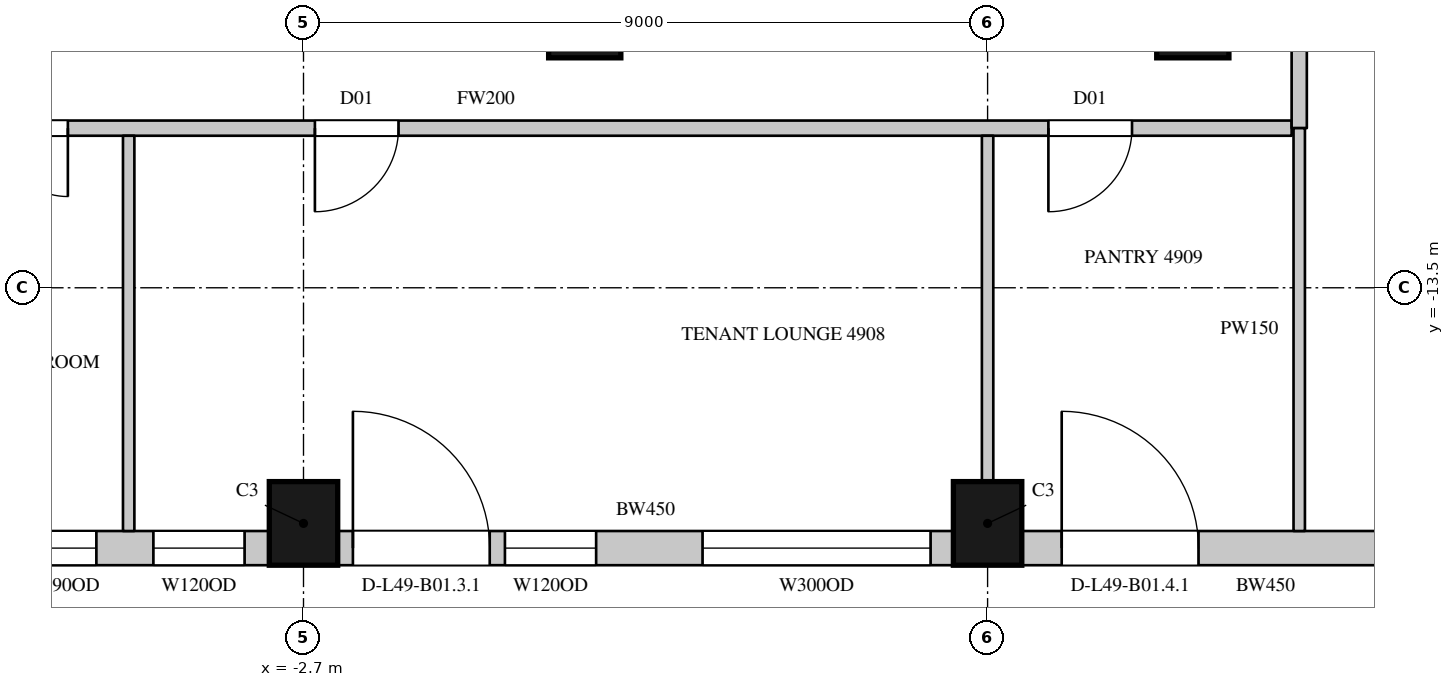
"""IFC4 building model, lengths in metres.
Left out: names, types, materials, properties, quantities, classifications, styles, units other than length and angle.
Written with IfcOpenShell. Run it as: python <this file> out.ifc"""

import sys

from ifc_helpers import new_model, si_unit, direction, frame, frame_2d, origin, origin_2d, place, context, subcontext, project, spatial, rectangle, circle, extrude, element, fill, save


model = new_model("IFC4")
c1 = context("Model", 3, precision=1e-05, world=origin(), true_north=direction((0.0, 1.0)))
c2 = subcontext(c1, "Body", "Model", "MODEL_VIEW")
j1 = project(units=[si_unit("LENGTHUNIT", "METRE"), si_unit("PLANEANGLEUNIT", "RADIAN")], contexts=[c1])
p1 = place(None, origin())
s1 = spatial("IfcSite", under=j1, at=p1, CompositionType="ELEMENT")
p2 = place(p1, origin())
s2 = spatial("IfcBuilding", under=s1, at=p2, CompositionType="ELEMENT")
p3 = place(p2, frame((0.0, 0.0, 222.0)))
s3 = spatial("IfcBuildingStorey", under=s2, at=p3, CompositionType="ELEMENT", Elevation=222.0)
for number, where, z_axis, x_axis in (
    (1, (-2.7, -16.6, 0.0), (0.0, 0.0, 1.0), (1.0, 0.0, 0.0)),
    (2, (6.3, -16.6, 0.0), (0.0, 0.0, 1.0), (1.0, 0.0, 0.0)),
):
    element("IfcColumn", number, at=place(p3, frame(where, z_axis=z_axis, x_axis=x_axis)), inside=s3, PredefinedType="COLUMN", context=c2, shape_type="SweptSolid", body=[
        extrude(rectangle(XDim=0.9, YDim=1.1, at=origin_2d()), origin(), (0.0, 0.0, 1.0), 4.1),
    ])
for number, where, z_axis, x_axis in (
    (3, (1.0, -10.0, 0.0), (0.0, 0.0, 1.0), (1.0, 0.0, 0.0)),
    (4, (9.0, -10.0, 0.0), (0.0, 0.0, 1.0), (1.0, 0.0, 0.0)),
):
    element("IfcColumn", number, at=place(p3, frame(where, z_axis=z_axis, x_axis=x_axis)), inside=s3, PredefinedType="COLUMN", context=c2, shape_type="SweptSolid", body=[
        extrude(circle(Radius=0.475, at=origin_2d()), origin(), (0.0, 0.0, 1.0), 4.1),
    ])
p4 = place(p3, frame((-11.25, -16.925, 0.0), z_axis=(0.0, 0.0, 1.0), x_axis=(1.0, 0.0, 0.0)))
e5 = element("IfcWall", 5, at=p4, inside=s3, PredefinedType="SOLIDWALL", context=c2, shape_type="SweptSolid", body=[
    extrude(rectangle(XDim=8.1, YDim=0.45, at=frame_2d((4.05, 0.0))), origin(), (0.0, 0.0, 1.0), 3.8),
])
p5 = place(p4, frame((0.3, 0.0, 1.05)))
e6 = element("IfcOpeningElement", 6, at=p5, cuts=e5, PredefinedType="OPENING", context=c2, shape_type="SweptSolid", body=[
    extrude(rectangle(XDim=3.0, YDim=2.4, at=frame_2d((1.5, 1.2))), frame((0.0, 0.235, 0.0), z_axis=(0.0, -1.0, 0.0), x_axis=(1.0, 0.0, 0.0)), (0.0, 0.0, 1.0), 0.47),
])
p6 = place(p4, frame((4.925, 0.0, 1.05)))
e7 = element("IfcOpeningElement", 7, at=p6, cuts=e5, PredefinedType="OPENING", context=c2, shape_type="SweptSolid", body=[
    extrude(rectangle(XDim=0.9, YDim=2.4, at=frame_2d((0.45, 1.2))), frame((0.0, 0.235, 0.0), z_axis=(0.0, -1.0, 0.0), x_axis=(1.0, 0.0, 0.0)), (0.0, 0.0, 1.0), 0.47),
])
p7 = place(p4, frame((6.575, 0.0, 1.05)))
e8 = element("IfcOpeningElement", 8, at=p7, cuts=e5, PredefinedType="OPENING", context=c2, shape_type="SweptSolid", body=[
    extrude(rectangle(XDim=1.2, YDim=2.4, at=frame_2d((0.6, 1.2))), frame((0.0, 0.235, 0.0), z_axis=(0.0, -1.0, 0.0), x_axis=(1.0, 0.0, 0.0)), (0.0, 0.0, 1.0), 0.47),
])
p8 = place(p3, frame((-2.25, -16.925, 0.0), z_axis=(0.0, 0.0, 1.0), x_axis=(1.0, 0.0, 0.0)))
e9 = element("IfcWall", 9, at=p8, inside=s3, PredefinedType="SOLIDWALL", context=c2, shape_type="SweptSolid", body=[
    extrude(rectangle(XDim=8.1, YDim=0.45, at=frame_2d((4.05, 0.0))), origin(), (0.0, 0.0, 1.0), 3.8),
])
p9 = place(p8, frame((0.2, 0.0, 0.0)))
e10 = element("IfcOpeningElement", 10, at=p9, cuts=e9, PredefinedType="OPENING", context=c2, shape_type="SweptSolid", body=[
    extrude(rectangle(XDim=1.8, YDim=2.4, at=frame_2d((0.9, 1.2))), frame((0.0, 0.235, 0.0), z_axis=(0.0, -1.0, 0.0), x_axis=(1.0, 0.0, 0.0)), (0.0, 0.0, 1.0), 0.47),
])
p10 = place(p8, frame((2.2, 0.0, 1.05)))
e11 = element("IfcOpeningElement", 11, at=p10, cuts=e9, PredefinedType="OPENING", context=c2, shape_type="SweptSolid", body=[
    extrude(rectangle(XDim=1.2, YDim=2.4, at=frame_2d((0.6, 1.2))), frame((0.0, 0.235, 0.0), z_axis=(0.0, -1.0, 0.0), x_axis=(1.0, 0.0, 0.0)), (0.0, 0.0, 1.0), 0.47),
])
p11 = place(p8, frame((4.8, 0.0, 1.05)))
e12 = element("IfcOpeningElement", 12, at=p11, cuts=e9, PredefinedType="OPENING", context=c2, shape_type="SweptSolid", body=[
    extrude(rectangle(XDim=3.0, YDim=2.4, at=frame_2d((1.5, 1.2))), frame((0.0, 0.235, 0.0), z_axis=(0.0, -1.0, 0.0), x_axis=(1.0, 0.0, 0.0)), (0.0, 0.0, 1.0), 0.47),
])
p12 = place(p3, frame((6.75, -16.925, 0.0), z_axis=(0.0, 0.0, 1.0), x_axis=(1.0, 0.0, 0.0)))
e13 = element("IfcWall", 13, at=p12, inside=s3, PredefinedType="SOLIDWALL", context=c2, shape_type="SweptSolid", body=[
    extrude(rectangle(XDim=6.414, YDim=0.45, at=frame_2d((3.207, 0.0))), origin(), (0.0, 0.0, 1.0), 3.8),
])
p13 = place(p12, frame((0.525, 0.0, 0.0)))
e14 = element("IfcOpeningElement", 14, at=p13, cuts=e13, PredefinedType="OPENING", context=c2, shape_type="SweptSolid", body=[
    extrude(rectangle(XDim=1.8, YDim=2.4, at=frame_2d((0.9, 1.2))), frame((0.0, 0.235, 0.0), z_axis=(0.0, -1.0, 0.0), x_axis=(1.0, 0.0, 0.0)), (0.0, 0.0, 1.0), 0.47),
])
p14 = place(p3, frame((-10.9, -11.4, 0.0), z_axis=(0.0, 0.0, 1.0), x_axis=(1.0, 0.0, 0.0)))
e15 = element("IfcWall", 15, at=p14, inside=s3, PredefinedType="PARTITIONING", context=c2, shape_type="SweptSolid", body=[
    extrude(rectangle(XDim=21.2, YDim=0.2, at=frame_2d((10.6, 0.0))), origin(), (0.0, 0.0, 1.0), 3.8),
])
p15 = place(p14, frame((0.95, 0.0, 0.0)))
e16 = element("IfcOpeningElement", 16, at=p15, cuts=e15, PredefinedType="OPENING", context=c2, shape_type="SweptSolid", body=[
    extrude(rectangle(XDim=0.95, YDim=2.2, at=frame_2d((0.475, 1.1))), frame((0.0, 0.11, 0.0), z_axis=(0.0, -1.0, 0.0), x_axis=(1.0, 0.0, 0.0)), (0.0, 0.0, 1.0), 0.22),
])
p16 = place(p14, frame((4.2, 0.0, 0.0)))
e17 = element("IfcOpeningElement", 17, at=p16, cuts=e15, PredefinedType="OPENING", context=c2, shape_type="SweptSolid", body=[
    extrude(rectangle(XDim=0.9, YDim=2.2, at=frame_2d((0.45, 1.1))), frame((0.0, 0.11, 0.0), z_axis=(0.0, -1.0, 0.0), x_axis=(1.0, 0.0, 0.0)), (0.0, 0.0, 1.0), 0.22),
])
p17 = place(p14, frame((8.35, 0.0, 0.0)))
e18 = element("IfcOpeningElement", 18, at=p17, cuts=e15, PredefinedType="OPENING", context=c2, shape_type="SweptSolid", body=[
    extrude(rectangle(XDim=1.1, YDim=2.4, at=frame_2d((0.55, 1.2))), frame((0.0, 0.11, 0.0), z_axis=(0.0, -1.0, 0.0), x_axis=(1.0, 0.0, 0.0)), (0.0, 0.0, 1.0), 0.22),
])
p18 = place(p14, frame((18.0, 0.0, 0.0)))
e19 = element("IfcOpeningElement", 19, at=p18, cuts=e15, PredefinedType="OPENING", context=c2, shape_type="SweptSolid", body=[
    extrude(rectangle(XDim=1.1, YDim=2.4, at=frame_2d((0.55, 1.2))), frame((0.0, 0.11, 0.0), z_axis=(0.0, -1.0, 0.0), x_axis=(1.0, 0.0, 0.0)), (0.0, 0.0, 1.0), 0.22),
])
p19 = place(p3, frame((10.4, -11.4, 0.0), z_axis=(0.0, 0.0, 1.0), x_axis=(0.0, 1.0, 0.0)))
e20 = element("IfcWall", 20, at=p19, inside=s3, PredefinedType="PARTITIONING", context=c2, shape_type="SweptSolid", body=[
    extrude(rectangle(XDim=23.5, YDim=0.2, at=frame_2d((11.75, 0.0))), origin(), (0.0, 0.0, 1.0), 3.8),
])
p20 = place(p19, frame((9.25, 0.0, 0.0)))
e21 = element("IfcOpeningElement", 21, at=p20, cuts=e20, PredefinedType="OPENING", context=c2, shape_type="SweptSolid", body=[
    extrude(rectangle(XDim=1.5, YDim=2.4, at=frame_2d((0.75, 1.2))), frame((0.0, 0.11, 0.0), z_axis=(0.0, -1.0, 0.0), x_axis=(1.0, 0.0, 0.0)), (0.0, 0.0, 1.0), 0.22),
])
p21 = place(p19, frame((2.85, 0.0, 0.0)))
e22 = element("IfcOpeningElement", 22, at=p21, cuts=e20, PredefinedType="OPENING", context=c2, shape_type="SweptSolid", body=[
    extrude(rectangle(XDim=1.1, YDim=2.4, at=frame_2d((0.55, 1.2))), frame((0.0, 0.11, 0.0), z_axis=(0.0, -1.0, 0.0), x_axis=(1.0, 0.0, 0.0)), (0.0, 0.0, 1.0), 0.22),
])
p22 = place(p3, frame((-5.0, -16.7, 0.0), z_axis=(0.0, 0.0, 1.0), x_axis=(0.0, 1.0, 0.0)))
e23 = element("IfcWall", 23, at=p22, inside=s3, PredefinedType="PARTITIONING", context=c2, shape_type="SweptSolid", body=[
    extrude(rectangle(XDim=5.2, YDim=0.15, at=frame_2d((2.6, 0.0))), origin(), (0.0, 0.0, 1.0), 3.8),
])
p23 = place(p3, frame((6.3, -16.05, 0.0), z_axis=(0.0, 0.0, 1.0), x_axis=(0.0, 1.0, 0.0)))
e24 = element("IfcWall", 24, at=p23, inside=s3, PredefinedType="PARTITIONING", context=c2, shape_type="SweptSolid", body=[
    extrude(rectangle(XDim=4.55, YDim=0.15, at=frame_2d((2.275, 0.0))), origin(), (0.0, 0.0, 1.0), 3.25),
])
p24 = place(p3, frame((10.4, -16.7, 0.0), z_axis=(0.0, 0.0, 1.0), x_axis=(0.0, 1.0, 0.0)))
e25 = element("IfcWall", 25, at=p24, inside=s3, PredefinedType="PARTITIONING", context=c2, shape_type="SweptSolid", body=[
    extrude(rectangle(XDim=5.3, YDim=0.15, at=frame_2d((2.65, 0.0))), origin(), (0.0, 0.0, 1.0), 3.8),
])
p25 = place(p9, origin())
e26 = element("IfcDoor", 26, at=p25, inside=s3, OperationType="SLIDING_TO_LEFT", PredefinedType="DOOR", context=c2, shape_type="SweptSolid", body=[
    extrude(rectangle(XDim=1.8, YDim=2.4, at=frame_2d((0.9, 1.2))), frame((0.0, 0.13, 0.0), z_axis=(0.0, -1.0, 0.0), x_axis=(1.0, 0.0, 0.0)), (0.0, 0.0, 1.0), 0.05),
])
fill(e10, e26)
p26 = place(p10, origin())
e27 = element("IfcWindow", 27, at=p26, inside=s3, PartitioningType="SINGLE_PANEL", PredefinedType="WINDOW", context=c2, shape_type="SweptSolid", body=[
    extrude(rectangle(XDim=1.2, YDim=2.4, at=frame_2d((0.6, 1.2))), frame((0.0, 0.135, 0.0), z_axis=(0.0, -1.0, 0.0), x_axis=(1.0, 0.0, 0.0)), (0.0, 0.0, 1.0), 0.06),
])
fill(e11, e27)
p27 = place(p11, origin())
e28 = element("IfcWindow", 28, at=p27, inside=s3, PartitioningType="SINGLE_PANEL", PredefinedType="WINDOW", context=c2, shape_type="SweptSolid", body=[
    extrude(rectangle(XDim=3.0, YDim=2.4, at=frame_2d((1.5, 1.2))), frame((0.0, 0.135, 0.0), z_axis=(0.0, -1.0, 0.0), x_axis=(1.0, 0.0, 0.0)), (0.0, 0.0, 1.0), 0.06),
])
fill(e12, e28)
p28 = place(p13, origin())
e29 = element("IfcDoor", 29, at=p28, inside=s3, OperationType="SLIDING_TO_LEFT", PredefinedType="DOOR", context=c2, shape_type="SweptSolid", body=[
    extrude(rectangle(XDim=1.8, YDim=2.4, at=frame_2d((0.9, 1.2))), frame((0.0, 0.13, 0.0), z_axis=(0.0, -1.0, 0.0), x_axis=(1.0, 0.0, 0.0)), (0.0, 0.0, 1.0), 0.05),
])
fill(e14, e29)
p29 = place(p16, origin())
e30 = element("IfcDoor", 30, at=p29, inside=s3, OperationType="SINGLE_SWING_LEFT", PredefinedType="DOOR", context=c2, shape_type="SweptSolid", body=[
    extrude(rectangle(XDim=0.9, YDim=2.2, at=frame_2d((0.45, 1.1))), frame((0.0, 0.025, 0.0), z_axis=(0.0, -1.0, 0.0), x_axis=(1.0, 0.0, 0.0)), (0.0, 0.0, 1.0), 0.05),
])
fill(e17, e30)
p30 = place(p17, origin())
e31 = element("IfcDoor", 31, at=p30, inside=s3, OperationType="SINGLE_SWING_RIGHT", PredefinedType="DOOR", context=c2, shape_type="SweptSolid", body=[
    extrude(rectangle(XDim=1.1, YDim=2.4, at=frame_2d((0.55, 1.2))), frame((0.0, 0.025, 0.0), z_axis=(0.0, -1.0, 0.0), x_axis=(1.0, 0.0, 0.0)), (0.0, 0.0, 1.0), 0.05),
])
fill(e18, e31)
p31 = place(p18, origin())
e32 = element("IfcDoor", 32, at=p31, inside=s3, OperationType="SINGLE_SWING_RIGHT", PredefinedType="DOOR", context=c2, shape_type="SweptSolid", body=[
    extrude(rectangle(XDim=1.1, YDim=2.4, at=frame_2d((0.55, 1.2))), frame((0.0, 0.025, 0.0), z_axis=(0.0, -1.0, 0.0), x_axis=(1.0, 0.0, 0.0)), (0.0, 0.0, 1.0), 0.05),
])
fill(e19, e32)
p32 = place(p6, origin())
e33 = element("IfcWindow", 33, at=p32, inside=s3, PartitioningType="SINGLE_PANEL", PredefinedType="WINDOW", context=c2, shape_type="SweptSolid", body=[
    extrude(rectangle(XDim=0.9, YDim=2.4, at=frame_2d((0.45, 1.2))), frame((0.0, 0.135, 0.0), z_axis=(0.0, -1.0, 0.0), x_axis=(1.0, 0.0, 0.0)), (0.0, 0.0, 1.0), 0.06),
])
fill(e7, e33)
p33 = place(p7, origin())
e34 = element("IfcWindow", 34, at=p33, inside=s3, PartitioningType="SINGLE_PANEL", PredefinedType="WINDOW", context=c2, shape_type="SweptSolid", body=[
    extrude(rectangle(XDim=1.2, YDim=2.4, at=frame_2d((0.6, 1.2))), frame((0.0, 0.135, 0.0), z_axis=(0.0, -1.0, 0.0), x_axis=(1.0, 0.0, 0.0)), (0.0, 0.0, 1.0), 0.06),
])
fill(e8, e34)
save(model, sys.argv[1])
